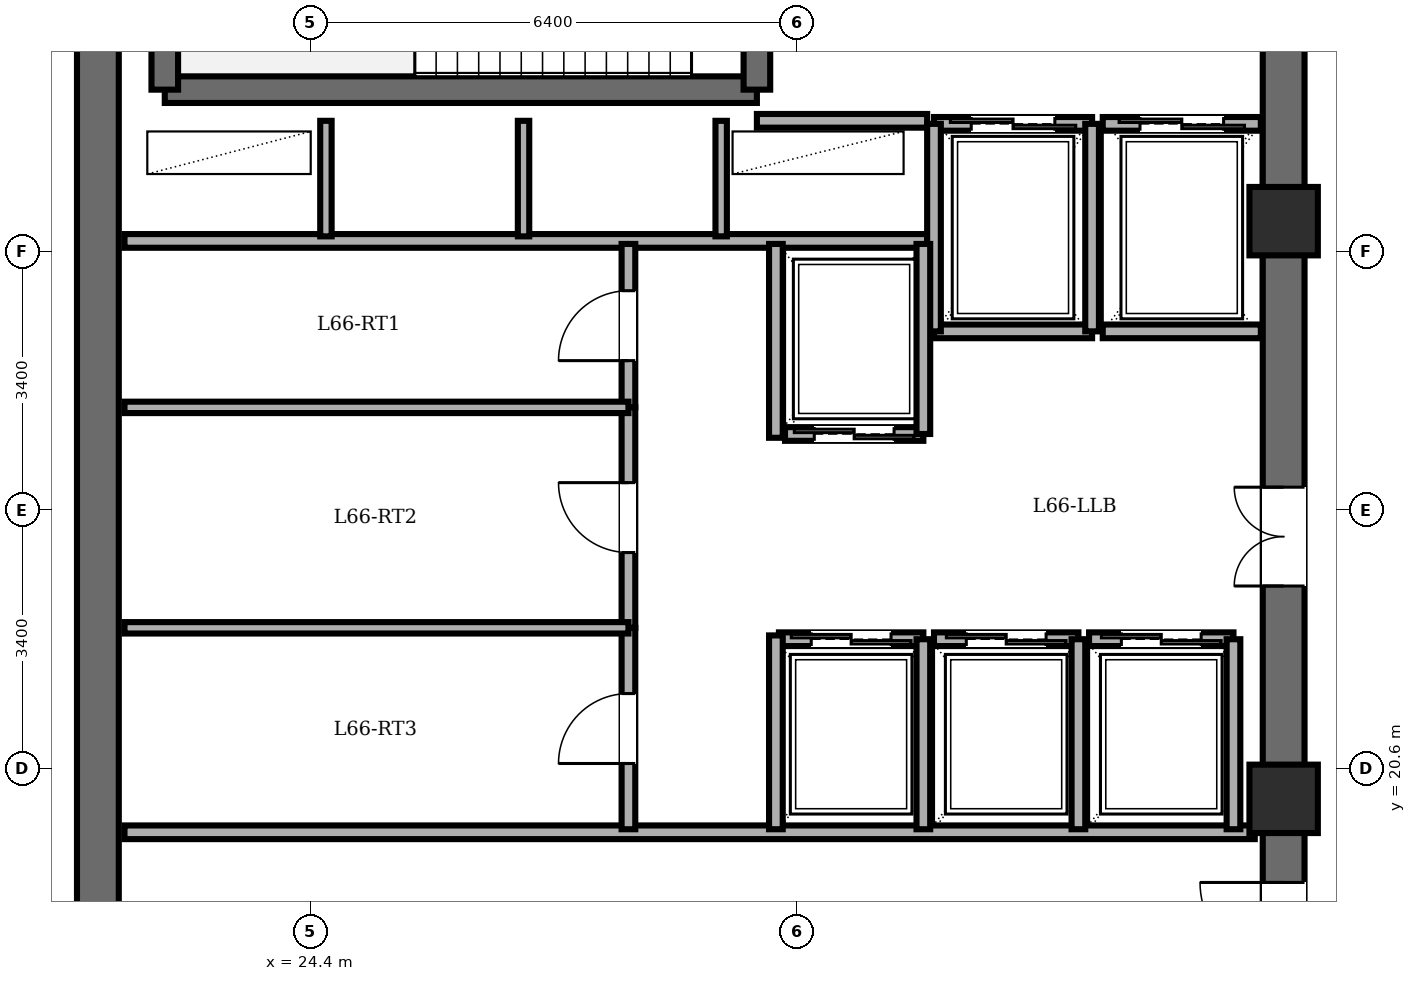
"""IFC4 building model, lengths in metres.
Left out: names, types, materials, properties, quantities, classifications, styles, units other than length and angle.
Written with IfcOpenShell. Run it as: python <this file> out.ifc"""

import sys

from ifc_helpers import new_model, si_unit, direction, frame, frame_2d, origin, origin_2d, place, context, subcontext, project, spatial, rectangle, extrude, element, fill, save


model = new_model("IFC4")
c1 = context("Model", 3, precision=1e-05, world=origin(), true_north=direction((0.0, 1.0)))
c2 = subcontext(c1, "Body", "Model", "MODEL_VIEW")
j1 = project(units=[si_unit("LENGTHUNIT", "METRE"), si_unit("PLANEANGLEUNIT", "RADIAN")], contexts=[c1])
p1 = place(None, origin())
s1 = spatial("IfcSite", under=j1, at=p1, CompositionType="ELEMENT")
p2 = place(p1, origin())
s2 = spatial("IfcBuilding", under=s1, at=p2, CompositionType="ELEMENT")
p3 = place(p2, frame((0.0, 0.0, 253.7)))
s3 = spatial("IfcBuildingStorey", under=s2, at=p3, CompositionType="ELEMENT", Elevation=253.7)
for number, where, z_axis, x_axis in (
    (1, (37.2, 20.2, 0.0), (0.0, 0.0, 1.0), (1.0, 0.0, 0.0)),
    (2, (37.2, 27.8, 0.0), (0.0, 0.0, 1.0), (1.0, 0.0, 0.0)),
):
    element("IfcColumn", number, at=place(p3, frame(where, z_axis=z_axis, x_axis=x_axis)), inside=s3, PredefinedType="COLUMN", context=c2, shape_type="SweptSolid", body=[
        extrude(rectangle(XDim=0.9, YDim=0.9, at=origin_2d()), origin(), (0.0, 0.0, 1.0), 5.1),
    ])
p4 = place(p3, frame((21.6, 14.4, 0.0), z_axis=(0.0, 0.0, 1.0), x_axis=(0.0, 1.0, 0.0)))
e3 = element("IfcWall", 3, at=p4, inside=s3, PredefinedType="SHEAR", context=c2, shape_type="SweptSolid", body=[
    extrude(rectangle(XDim=19.2, YDim=0.55, at=frame_2d((9.6, 0.0))), origin(), (0.0, 0.0, 1.0), 4.9),
])
p5 = place(p3, frame((37.2, 14.4, 0.0), z_axis=(0.0, 0.0, 1.0), x_axis=(0.0, 1.0, 0.0)))
e4 = element("IfcWall", 4, at=p5, inside=s3, PredefinedType="SHEAR", context=c2, shape_type="SweptSolid", body=[
    extrude(rectangle(XDim=19.2, YDim=0.55, at=frame_2d((9.6, 0.0))), origin(), (0.0, 0.0, 1.0), 4.9),
])
p6 = place(p5, frame((15.8, 0.0, 0.0)))
e5 = element("IfcOpeningElement", 5, at=p6, cuts=e4, PredefinedType="OPENING", context=c2, shape_type="SweptSolid", body=[
    extrude(rectangle(XDim=1.15, YDim=2.15, at=frame_2d((0.575, 1.075))), frame((0.0, 0.285, 0.0), z_axis=(0.0, -1.0, 0.0), x_axis=(1.0, 0.0, 0.0)), (0.0, 0.0, 1.0), 0.57),
])
p7 = place(p5, frame((3.6, 0.0, 0.0)))
e6 = element("IfcOpeningElement", 6, at=p7, cuts=e4, PredefinedType="OPENING", context=c2, shape_type="SweptSolid", body=[
    extrude(rectangle(XDim=1.1, YDim=2.15, at=frame_2d((0.55, 1.075))), frame((0.0, 0.285, 0.0), z_axis=(0.0, -1.0, 0.0), x_axis=(1.0, 0.0, 0.0)), (0.0, 0.0, 1.0), 0.57),
])
p8 = place(p5, frame((8.6, 0.0, 0.0)))
e7 = element("IfcOpeningElement", 7, at=p8, cuts=e4, PredefinedType="OPENING", context=c2, shape_type="SweptSolid", body=[
    extrude(rectangle(XDim=1.3, YDim=2.2, at=frame_2d((0.65, 1.1))), frame((0.0, 0.285, 0.0), z_axis=(0.0, -1.0, 0.0), x_axis=(1.0, 0.0, 0.0)), (0.0, 0.0, 1.0), 0.57),
])
p9 = place(p3, frame((22.48, 29.53, 0.0), z_axis=(0.0, 0.0, 1.0), x_axis=(1.0, 0.0, 0.0)))
e8 = element("IfcWall", 8, at=p9, inside=s3, PredefinedType="SOLIDWALL", context=c2, shape_type="SweptSolid", body=[
    extrude(rectangle(XDim=7.79, YDim=0.35, at=frame_2d((3.895, 0.0))), origin(), (0.0, 0.0, 1.0), 4.9),
])
p10 = place(p3, frame((22.48, 29.53, 0.0), z_axis=(0.0, 0.0, 1.0), x_axis=(0.0, 1.0, 0.0)))
e9 = element("IfcWall", 9, at=p10, inside=s3, PredefinedType="SOLIDWALL", context=c2, shape_type="SweptSolid", body=[
    extrude(rectangle(XDim=3.58, YDim=0.35, at=frame_2d((1.79, 0.0))), origin(), (0.0, 0.0, 1.0), 4.9),
])
p11 = place(p3, frame((30.27, 29.53, 0.0), z_axis=(0.0, 0.0, 1.0), x_axis=(0.0, 1.0, 0.0)))
e10 = element("IfcWall", 10, at=p11, inside=s3, PredefinedType="SOLIDWALL", context=c2, shape_type="SweptSolid", body=[
    extrude(rectangle(XDim=3.58, YDim=0.35, at=frame_2d((1.79, 0.0))), origin(), (0.0, 0.0, 1.0), 4.9),
])
p12 = place(p11, frame((1.25, 0.0, 0.0)))
e11 = element("IfcOpeningElement", 11, at=p12, cuts=e10, PredefinedType="OPENING", context=c2, shape_type="SweptSolid", body=[
    extrude(rectangle(XDim=1.1, YDim=2.15, at=frame_2d((0.55, 1.075))), frame((0.0, 0.185, 0.0), z_axis=(0.0, -1.0, 0.0), x_axis=(1.0, 0.0, 0.0)), (0.0, 0.0, 1.0), 0.37),
])
p13 = place(p3, frame((30.27, 29.12, 0.0), z_axis=(0.0, 0.0, 1.0), x_axis=(1.0, 0.0, 0.0)))
e12 = element("IfcWall", 12, at=p13, inside=s3, PredefinedType="PARTITIONING", context=c2, shape_type="SweptSolid", body=[
    extrude(rectangle(XDim=2.24, YDim=0.18, at=frame_2d((1.12, 0.0))), origin(), (0.0, 0.0, 1.0), 4.9),
])
p14 = place(p3, frame((21.95, 27.54, 0.0), z_axis=(0.0, 0.0, 1.0), x_axis=(1.0, 0.0, 0.0)))
e13 = element("IfcWall", 13, at=p14, inside=s3, PredefinedType="PARTITIONING", context=c2, shape_type="SweptSolid", body=[
    extrude(rectangle(XDim=10.56, YDim=0.18, at=frame_2d((5.28, 0.0))), origin(), (0.0, 0.0, 1.0), 4.9),
])
for number, where, z_axis, x_axis in (
    (14, (24.6, 27.6, 0.0), (0.0, 0.0, 1.0), (0.0, 1.0, 0.0)),
    (15, (27.2, 27.6, 0.0), (0.0, 0.0, 1.0), (0.0, 1.0, 0.0)),
    (16, (29.8, 27.6, 0.0), (0.0, 0.0, 1.0), (0.0, 1.0, 0.0)),
):
    element("IfcWall", number, at=place(p3, frame(where, z_axis=z_axis, x_axis=x_axis)), inside=s3, PredefinedType="PARTITIONING", context=c2, shape_type="SweptSolid", body=[
        extrude(rectangle(XDim=1.52, YDim=0.15, at=frame_2d((0.76, 0.0))), origin(), (0.0, 0.0, 1.0), 4.9),
    ])
p15 = place(p3, frame((21.95, 19.76, 0.0), z_axis=(0.0, 0.0, 1.0), x_axis=(1.0, 0.0, 0.0)))
e17 = element("IfcWall", 17, at=p15, inside=s3, PredefinedType="PARTITIONING", context=c2, shape_type="SweptSolid", body=[
    extrude(rectangle(XDim=14.87, YDim=0.18, at=frame_2d((7.435, 0.0))), origin(), (0.0, 0.0, 1.0), 4.9),
])
p16 = place(p3, frame((32.6, 29.08, 0.0), z_axis=(0.0, 0.0, 1.0), x_axis=(1.0, 0.0, 0.0)))
e18 = element("IfcWall", 18, at=p16, inside=s3, PredefinedType="PARTITIONING", context=c2, shape_type="SweptSolid", body=[
    extrude(rectangle(XDim=2.08, YDim=0.18, at=frame_2d((1.04, 0.0))), origin(), (0.0, 0.0, 1.0), 4.9),
])
p17 = place(p16, frame((0.49, 0.0, 0.0)))
e19 = element("IfcOpeningElement", 19, at=p17, cuts=e18, PredefinedType="OPENING", context=c2, shape_type="SweptSolid", body=[
    extrude(rectangle(XDim=1.1, YDim=2.2, at=frame_2d((0.55, 1.1))), frame((0.0, 0.1, 0.0), z_axis=(0.0, -1.0, 0.0), x_axis=(1.0, 0.0, 0.0)), (0.0, 0.0, 1.0), 0.2),
])
p18 = place(p3, frame((34.68, 26.35, 0.0), z_axis=(0.0, 0.0, 1.0), x_axis=(-1.0, 0.0, 0.0)))
e20 = element("IfcWall", 20, at=p18, inside=s3, PredefinedType="PARTITIONING", context=c2, shape_type="SweptSolid", body=[
    extrude(rectangle(XDim=2.08, YDim=0.18, at=frame_2d((1.04, 0.0))), origin(), (0.0, 0.0, 1.0), 4.9),
])
for number, where, z_axis, x_axis in (
    (21, (34.68, 26.35, 0.0), (0.0, 0.0, 1.0), (0.0, 1.0, 0.0)),
    (22, (32.6, 29.08, 0.0), (0.0, 0.0, 1.0), (0.0, -1.0, 0.0)),
):
    element("IfcWall", number, at=place(p3, frame(where, z_axis=z_axis, x_axis=x_axis)), inside=s3, PredefinedType="PARTITIONING", context=c2, shape_type="SweptSolid", body=[
        extrude(rectangle(XDim=2.73, YDim=0.18, at=frame_2d((1.365, 0.0))), origin(), (0.0, 0.0, 1.0), 4.9),
    ])
p19 = place(p3, frame((34.82, 29.08, 0.0), z_axis=(0.0, 0.0, 1.0), x_axis=(1.0, 0.0, 0.0)))
e23 = element("IfcWall", 23, at=p19, inside=s3, PredefinedType="PARTITIONING", context=c2, shape_type="SweptSolid", body=[
    extrude(rectangle(XDim=2.08, YDim=0.18, at=frame_2d((1.04, 0.0))), origin(), (0.0, 0.0, 1.0), 4.9),
])
p20 = place(p19, frame((0.49, 0.0, 0.0)))
e24 = element("IfcOpeningElement", 24, at=p20, cuts=e23, PredefinedType="OPENING", context=c2, shape_type="SweptSolid", body=[
    extrude(rectangle(XDim=1.1, YDim=2.2, at=frame_2d((0.55, 1.1))), frame((0.0, 0.1, 0.0), z_axis=(0.0, -1.0, 0.0), x_axis=(1.0, 0.0, 0.0)), (0.0, 0.0, 1.0), 0.2),
])
p21 = place(p3, frame((36.9, 26.35, 0.0), z_axis=(0.0, 0.0, 1.0), x_axis=(-1.0, 0.0, 0.0)))
e25 = element("IfcWall", 25, at=p21, inside=s3, PredefinedType="PARTITIONING", context=c2, shape_type="SweptSolid", body=[
    extrude(rectangle(XDim=2.08, YDim=0.18, at=frame_2d((1.04, 0.0))), origin(), (0.0, 0.0, 1.0), 4.9),
])
p22 = place(p3, frame((32.46, 25.0, 0.0), z_axis=(0.0, 0.0, 1.0), x_axis=(-1.0, 0.0, 0.0)))
e26 = element("IfcWall", 26, at=p22, inside=s3, PredefinedType="PARTITIONING", context=c2, shape_type="SweptSolid", body=[
    extrude(rectangle(XDim=1.82, YDim=0.18, at=frame_2d((0.91, 0.0))), origin(), (0.0, 0.0, 1.0), 4.9),
])
p23 = place(p22, frame((0.385, 0.0, 0.0)))
e27 = element("IfcOpeningElement", 27, at=p23, cuts=e26, PredefinedType="OPENING", context=c2, shape_type="SweptSolid", body=[
    extrude(rectangle(XDim=1.05, YDim=2.2, at=frame_2d((0.525, 1.1))), frame((0.0, 0.1, 0.0), z_axis=(0.0, -1.0, 0.0), x_axis=(1.0, 0.0, 0.0)), (0.0, 0.0, 1.0), 0.2),
])
p24 = place(p3, frame((32.46, 25.0, 0.0), z_axis=(0.0, 0.0, 1.0), x_axis=(0.0, 1.0, 0.0)))
e28 = element("IfcWall", 28, at=p24, inside=s3, PredefinedType="PARTITIONING", context=c2, shape_type="SweptSolid", body=[
    extrude(rectangle(XDim=2.5, YDim=0.18, at=frame_2d((1.25, 0.0))), origin(), (0.0, 0.0, 1.0), 4.9),
])
p25 = place(p3, frame((30.56, 22.3, 0.0), z_axis=(0.0, 0.0, 1.0), x_axis=(1.0, 0.0, 0.0)))
e29 = element("IfcWall", 29, at=p25, inside=s3, PredefinedType="PARTITIONING", context=c2, shape_type="SweptSolid", body=[
    extrude(rectangle(XDim=1.9, YDim=0.18, at=frame_2d((0.95, 0.0))), origin(), (0.0, 0.0, 1.0), 4.9),
])
p26 = place(p25, frame((0.425, 0.0, 0.0)))
e30 = element("IfcOpeningElement", 30, at=p26, cuts=e29, PredefinedType="OPENING", context=c2, shape_type="SweptSolid", body=[
    extrude(rectangle(XDim=1.05, YDim=2.2, at=frame_2d((0.525, 1.1))), frame((0.0, 0.1, 0.0), z_axis=(0.0, -1.0, 0.0), x_axis=(1.0, 0.0, 0.0)), (0.0, 0.0, 1.0), 0.2),
])
p27 = place(p3, frame((32.46, 19.8, 0.0), z_axis=(0.0, 0.0, 1.0), x_axis=(0.0, 1.0, 0.0)))
e31 = element("IfcWall", 31, at=p27, inside=s3, PredefinedType="PARTITIONING", context=c2, shape_type="SweptSolid", body=[
    extrude(rectangle(XDim=2.5, YDim=0.18, at=frame_2d((1.25, 0.0))), origin(), (0.0, 0.0, 1.0), 4.9),
])
p28 = place(p3, frame((32.6, 22.3, 0.0), z_axis=(0.0, 0.0, 1.0), x_axis=(1.0, 0.0, 0.0)))
e32 = element("IfcWall", 32, at=p28, inside=s3, PredefinedType="PARTITIONING", context=c2, shape_type="SweptSolid", body=[
    extrude(rectangle(XDim=1.9, YDim=0.18, at=frame_2d((0.95, 0.0))), origin(), (0.0, 0.0, 1.0), 4.9),
])
p29 = place(p28, frame((0.425, 0.0, 0.0)))
e33 = element("IfcOpeningElement", 33, at=p29, cuts=e32, PredefinedType="OPENING", context=c2, shape_type="SweptSolid", body=[
    extrude(rectangle(XDim=1.05, YDim=2.2, at=frame_2d((0.525, 1.1))), frame((0.0, 0.1, 0.0), z_axis=(0.0, -1.0, 0.0), x_axis=(1.0, 0.0, 0.0)), (0.0, 0.0, 1.0), 0.2),
])
p30 = place(p3, frame((34.5, 19.8, 0.0), z_axis=(0.0, 0.0, 1.0), x_axis=(0.0, 1.0, 0.0)))
e34 = element("IfcWall", 34, at=p30, inside=s3, PredefinedType="PARTITIONING", context=c2, shape_type="SweptSolid", body=[
    extrude(rectangle(XDim=2.5, YDim=0.18, at=frame_2d((1.25, 0.0))), origin(), (0.0, 0.0, 1.0), 4.9),
])
p31 = place(p3, frame((34.64, 22.3, 0.0), z_axis=(0.0, 0.0, 1.0), x_axis=(1.0, 0.0, 0.0)))
e35 = element("IfcWall", 35, at=p31, inside=s3, PredefinedType="PARTITIONING", context=c2, shape_type="SweptSolid", body=[
    extrude(rectangle(XDim=1.9, YDim=0.18, at=frame_2d((0.95, 0.0))), origin(), (0.0, 0.0, 1.0), 4.9),
])
p32 = place(p31, frame((0.425, 0.0, 0.0)))
e36 = element("IfcOpeningElement", 36, at=p32, cuts=e35, PredefinedType="OPENING", context=c2, shape_type="SweptSolid", body=[
    extrude(rectangle(XDim=1.05, YDim=2.2, at=frame_2d((0.525, 1.1))), frame((0.0, 0.1, 0.0), z_axis=(0.0, -1.0, 0.0), x_axis=(1.0, 0.0, 0.0)), (0.0, 0.0, 1.0), 0.2),
])
p33 = place(p3, frame((36.54, 19.8, 0.0), z_axis=(0.0, 0.0, 1.0), x_axis=(0.0, 1.0, 0.0)))
e37 = element("IfcWall", 37, at=p33, inside=s3, PredefinedType="PARTITIONING", context=c2, shape_type="SweptSolid", body=[
    extrude(rectangle(XDim=2.5, YDim=0.18, at=frame_2d((1.25, 0.0))), origin(), (0.0, 0.0, 1.0), 4.9),
])
for number, where, z_axis, x_axis in (
    (38, (30.52, 24.95, 0.0), (0.0, 0.0, 1.0), (0.0, 1.0, 0.0)),
    (39, (30.52, 19.8, 0.0), (0.0, 0.0, 1.0), (0.0, 1.0, 0.0)),
):
    element("IfcWall", number, at=place(p3, frame(where, z_axis=z_axis, x_axis=x_axis)), inside=s3, PredefinedType="PARTITIONING", context=c2, shape_type="SweptSolid", body=[
        extrude(rectangle(XDim=2.55, YDim=0.18, at=frame_2d((1.275, 0.0))), origin(), (0.0, 0.0, 1.0), 4.9),
    ])
p34 = place(p3, frame((28.58, 25.35, 0.0), z_axis=(0.0, 0.0, 1.0), x_axis=(0.0, 1.0, 0.0)))
e40 = element("IfcWall", 40, at=p34, inside=s3, PredefinedType="PARTITIONING", context=c2, shape_type="SweptSolid", body=[
    extrude(rectangle(XDim=2.15, YDim=0.18, at=frame_2d((1.075, 0.0))), origin(), (0.0, 0.0, 1.0), 4.9),
])
p35 = place(p34, frame((0.615, 0.0, 0.0)))
e41 = element("IfcOpeningElement", 41, at=p35, cuts=e40, PredefinedType="OPENING", context=c2, shape_type="SweptSolid", body=[
    extrude(rectangle(XDim=0.92, YDim=2.1, at=frame_2d((0.46, 1.05))), frame((0.0, 0.1, 0.0), z_axis=(0.0, -1.0, 0.0), x_axis=(1.0, 0.0, 0.0)), (0.0, 0.0, 1.0), 0.2),
])
p36 = place(p3, frame((28.58, 22.45, 0.0), z_axis=(0.0, 0.0, 1.0), x_axis=(0.0, 1.0, 0.0)))
e42 = element("IfcWall", 42, at=p36, inside=s3, PredefinedType="PARTITIONING", context=c2, shape_type="SweptSolid", body=[
    extrude(rectangle(XDim=2.9, YDim=0.18, at=frame_2d((1.45, 0.0))), origin(), (0.0, 0.0, 1.0), 4.9),
])
p37 = place(p36, frame((0.99, 0.0, 0.0)))
e43 = element("IfcOpeningElement", 43, at=p37, cuts=e42, PredefinedType="OPENING", context=c2, shape_type="SweptSolid", body=[
    extrude(rectangle(XDim=0.92, YDim=2.1, at=frame_2d((0.46, 1.05))), frame((0.0, 0.1, 0.0), z_axis=(0.0, -1.0, 0.0), x_axis=(1.0, 0.0, 0.0)), (0.0, 0.0, 1.0), 0.2),
])
p38 = place(p3, frame((28.58, 19.8, 0.0), z_axis=(0.0, 0.0, 1.0), x_axis=(0.0, 1.0, 0.0)))
e44 = element("IfcWall", 44, at=p38, inside=s3, PredefinedType="PARTITIONING", context=c2, shape_type="SweptSolid", body=[
    extrude(rectangle(XDim=2.65, YDim=0.18, at=frame_2d((1.325, 0.0))), origin(), (0.0, 0.0, 1.0), 4.9),
])
p39 = place(p38, frame((0.865, 0.0, 0.0)))
e45 = element("IfcOpeningElement", 45, at=p39, cuts=e44, PredefinedType="OPENING", context=c2, shape_type="SweptSolid", body=[
    extrude(rectangle(XDim=0.92, YDim=2.1, at=frame_2d((0.46, 1.05))), frame((0.0, 0.1, 0.0), z_axis=(0.0, -1.0, 0.0), x_axis=(1.0, 0.0, 0.0)), (0.0, 0.0, 1.0), 0.2),
])
for number, where, z_axis, x_axis in (
    (46, (21.95, 25.35, 0.0), (0.0, 0.0, 1.0), (1.0, 0.0, 0.0)),
    (47, (21.95, 22.45, 0.0), (0.0, 0.0, 1.0), (1.0, 0.0, 0.0)),
):
    element("IfcWall", number, at=place(p3, frame(where, z_axis=z_axis, x_axis=x_axis)), inside=s3, PredefinedType="PARTITIONING", context=c2, shape_type="SweptSolid", body=[
        extrude(rectangle(XDim=6.63, YDim=0.15, at=frame_2d((3.315, 0.0))), origin(), (0.0, 0.0, 1.0), 4.9),
    ])
p40 = place(p7, origin())
e48 = element("IfcDoor", 48, at=p40, inside=s3, OperationType="SINGLE_SWING_RIGHT", PredefinedType="DOOR", context=c2, shape_type="SweptSolid", body=[
    extrude(rectangle(XDim=1.1, YDim=2.15, at=frame_2d((0.55, 1.075))), frame((0.0, 0.025, 0.0), z_axis=(0.0, -1.0, 0.0), x_axis=(1.0, 0.0, 0.0)), (0.0, 0.0, 1.0), 0.05),
])
fill(e6, e48)
p41 = place(p17, origin())
e49 = element("IfcDoor", 49, at=p41, inside=s3, OperationType="DOUBLE_DOOR_SLIDING", PredefinedType="DOOR", context=c2, shape_type="SweptSolid", body=[
    extrude(rectangle(XDim=1.1, YDim=2.2, at=frame_2d((0.55, 1.1))), frame((0.0, 0.025, 0.0), z_axis=(0.0, -1.0, 0.0), x_axis=(1.0, 0.0, 0.0)), (0.0, 0.0, 1.0), 0.05),
])
fill(e19, e49)
p42 = place(p20, origin())
e50 = element("IfcDoor", 50, at=p42, inside=s3, OperationType="DOUBLE_DOOR_SLIDING", PredefinedType="DOOR", context=c2, shape_type="SweptSolid", body=[
    extrude(rectangle(XDim=1.1, YDim=2.2, at=frame_2d((0.55, 1.1))), frame((0.0, 0.025, 0.0), z_axis=(0.0, -1.0, 0.0), x_axis=(1.0, 0.0, 0.0)), (0.0, 0.0, 1.0), 0.05),
])
fill(e24, e50)
p43 = place(p23, origin())
e51 = element("IfcDoor", 51, at=p43, inside=s3, OperationType="DOUBLE_DOOR_SLIDING", PredefinedType="DOOR", context=c2, shape_type="SweptSolid", body=[
    extrude(rectangle(XDim=1.05, YDim=2.2, at=frame_2d((0.525, 1.1))), frame((0.0, 0.025, 0.0), z_axis=(0.0, -1.0, 0.0), x_axis=(1.0, 0.0, 0.0)), (0.0, 0.0, 1.0), 0.05),
])
fill(e27, e51)
p44 = place(p26, origin())
e52 = element("IfcDoor", 52, at=p44, inside=s3, OperationType="DOUBLE_DOOR_SLIDING", PredefinedType="DOOR", context=c2, shape_type="SweptSolid", body=[
    extrude(rectangle(XDim=1.05, YDim=2.2, at=frame_2d((0.525, 1.1))), frame((0.0, 0.025, 0.0), z_axis=(0.0, -1.0, 0.0), x_axis=(1.0, 0.0, 0.0)), (0.0, 0.0, 1.0), 0.05),
])
fill(e30, e52)
p45 = place(p29, origin())
e53 = element("IfcDoor", 53, at=p45, inside=s3, OperationType="DOUBLE_DOOR_SLIDING", PredefinedType="DOOR", context=c2, shape_type="SweptSolid", body=[
    extrude(rectangle(XDim=1.05, YDim=2.2, at=frame_2d((0.525, 1.1))), frame((0.0, 0.025, 0.0), z_axis=(0.0, -1.0, 0.0), x_axis=(1.0, 0.0, 0.0)), (0.0, 0.0, 1.0), 0.05),
])
fill(e33, e53)
p46 = place(p32, origin())
e54 = element("IfcDoor", 54, at=p46, inside=s3, OperationType="DOUBLE_DOOR_SLIDING", PredefinedType="DOOR", context=c2, shape_type="SweptSolid", body=[
    extrude(rectangle(XDim=1.05, YDim=2.2, at=frame_2d((0.525, 1.1))), frame((0.0, 0.025, 0.0), z_axis=(0.0, -1.0, 0.0), x_axis=(1.0, 0.0, 0.0)), (0.0, 0.0, 1.0), 0.05),
])
fill(e36, e54)
p47 = place(p35, origin())
e55 = element("IfcDoor", 55, at=p47, inside=s3, OperationType="SINGLE_SWING_LEFT", PredefinedType="DOOR", context=c2, shape_type="SweptSolid", body=[
    extrude(rectangle(XDim=0.92, YDim=2.1, at=frame_2d((0.46, 1.05))), frame((0.0, 0.025, 0.0), z_axis=(0.0, -1.0, 0.0), x_axis=(1.0, 0.0, 0.0)), (0.0, 0.0, 1.0), 0.05),
])
fill(e41, e55)
p48 = place(p37, origin())
e56 = element("IfcDoor", 56, at=p48, inside=s3, OperationType="SINGLE_SWING_RIGHT", PredefinedType="DOOR", context=c2, shape_type="SweptSolid", body=[
    extrude(rectangle(XDim=0.92, YDim=2.1, at=frame_2d((0.46, 1.05))), frame((0.0, 0.025, 0.0), z_axis=(0.0, -1.0, 0.0), x_axis=(1.0, 0.0, 0.0)), (0.0, 0.0, 1.0), 0.05),
])
fill(e43, e56)
p49 = place(p39, origin())
e57 = element("IfcDoor", 57, at=p49, inside=s3, OperationType="SINGLE_SWING_LEFT", PredefinedType="DOOR", context=c2, shape_type="SweptSolid", body=[
    extrude(rectangle(XDim=0.92, YDim=2.1, at=frame_2d((0.46, 1.05))), frame((0.0, 0.025, 0.0), z_axis=(0.0, -1.0, 0.0), x_axis=(1.0, 0.0, 0.0)), (0.0, 0.0, 1.0), 0.05),
])
fill(e45, e57)
p50 = place(p8, origin())
e58 = element("IfcDoor", 58, at=p50, inside=s3, OperationType="DOUBLE_DOOR_SINGLE_SWING", PredefinedType="DOOR", context=c2, shape_type="SweptSolid", body=[
    extrude(rectangle(XDim=1.3, YDim=2.2, at=frame_2d((0.65, 1.1))), frame((0.0, 0.025, 0.0), z_axis=(0.0, -1.0, 0.0), x_axis=(1.0, 0.0, 0.0)), (0.0, 0.0, 1.0), 0.05),
])
fill(e7, e58)
save(model, sys.argv[1])
